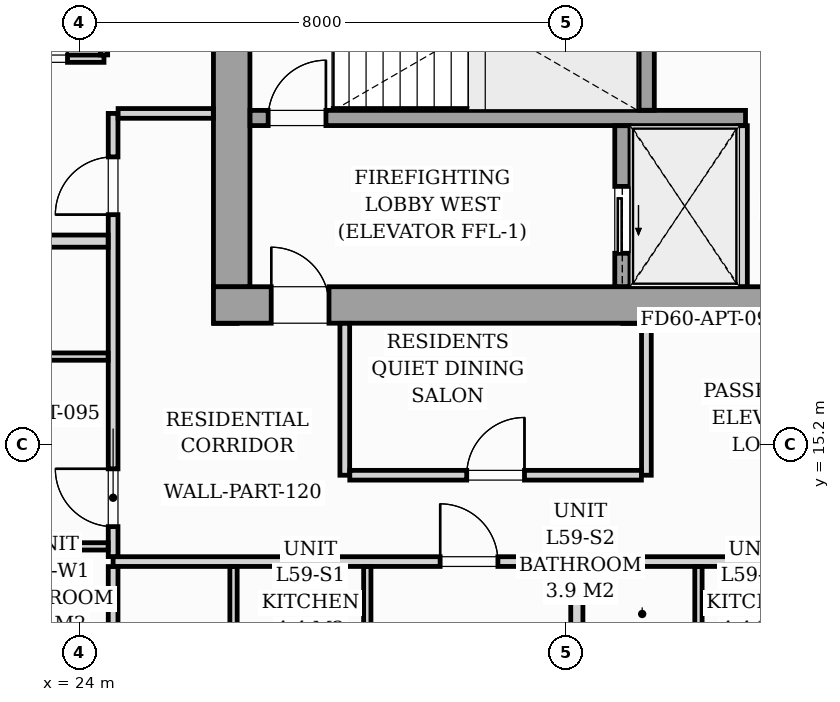
"""IFC4 building model, lengths in metres.
Left out: names, types, materials, properties, quantities, classifications, styles, units other than length and angle.
Written with IfcOpenShell. Run it as: python <this file> out.ifc"""

import sys

from ifc_helpers import new_model, si_unit, direction, frame, frame_2d, origin, origin_2d, place, context, subcontext, project, spatial, rectangle, i_section, extrude, source, transform, mapped, element, fill, save


model = new_model("IFC4")
c1 = context("Model", 3, precision=1e-05, world=origin(), true_north=direction((0.0, 1.0)))
c2 = subcontext(c1, "Body", "Model", "MODEL_VIEW")
j1 = project(units=[si_unit("LENGTHUNIT", "METRE"), si_unit("PLANEANGLEUNIT", "RADIAN")], contexts=[c1])
p1 = place(None, origin())
s1 = spatial("IfcSite", under=j1, at=p1, CompositionType="ELEMENT")
p2 = place(p1, origin())
s2 = spatial("IfcBuilding", under=s1, at=p2, CompositionType="ELEMENT")
p3 = place(p2, frame((0.0, 0.0, 205.0)))
s3 = spatial("IfcBuildingStorey", under=s2, at=p3, CompositionType="ELEMENT", Elevation=205.0)
m1 = source(origin(), c2, "Body", "SweptSolid", [
    extrude(i_section(OverallWidth=0.416, OverallDepth=0.446, WebThickness=0.039, FlangeThickness=0.063, FilletRadius=0.018, at=origin_2d()), origin(), (0.0, 0.0, 1.0), 3.196),
])
for number, where, z_axis, x_axis in (
    (1, (26.4, 17.4, 0.002), (0.0, 0.0, 1.0), (1.0, 0.0, 0.0)),
    (2, (33.12, 17.4, 0.002), (0.0, 0.0, 1.0), (1.0, 0.0, 0.0)),
):
    element("IfcColumn", number, at=place(p3, frame(where, z_axis=z_axis, x_axis=x_axis)), inside=s3, PredefinedType="PILASTER", context=c2, shape_type="MappedRepresentation", body=[
        mapped(m1, transform((0.0, 0.0, 0.0), scale=1.0)),
    ])
p4 = place(p3, frame((26.2, 17.5, 0.0), z_axis=(0.0, 0.0, 1.0), x_axis=(1.0, 0.0, 0.0)))
e3 = element("IfcWall", 3, at=p4, inside=s3, PredefinedType="SHEAR", context=c2, shape_type="SweptSolid", body=[
    extrude(rectangle(XDim=19.6, YDim=0.6, at=frame_2d((9.8, 0.0))), origin(), (0.0, 0.0, 1.0), 3.2),
])
p5 = place(p4, frame((0.95, 0.0, 0.0)))
e4 = element("IfcOpeningElement", 4, at=p5, cuts=e3, PredefinedType="OPENING", context=c2, shape_type="SweptSolid", body=[
    extrude(rectangle(XDim=0.95, YDim=2.06, at=frame_2d((0.475, 1.03))), frame((0.0, 0.31, 0.0), z_axis=(0.0, -1.0, 0.0), x_axis=(1.0, 0.0, 0.0)), (0.0, 0.0, 1.0), 0.62),
])
p6 = place(p4, frame((9.38, 0.0, 0.0)))
e5 = element("IfcOpeningElement", 5, at=p6, cuts=e3, PredefinedType="OPENING", context=c2, shape_type="SweptSolid", body=[
    extrude(rectangle(XDim=0.85, YDim=2.0, at=frame_2d((0.425, 1.0))), frame((0.0, 0.31, 0.0), z_axis=(0.0, -1.0, 0.0), x_axis=(1.0, 0.0, 0.0)), (0.0, 0.0, 1.0), 0.62),
])
p7 = place(p4, frame((17.55, 0.0, 0.0)))
e6 = element("IfcOpeningElement", 6, at=p7, cuts=e3, PredefinedType="OPENING", context=c2, shape_type="SweptSolid", body=[
    extrude(rectangle(XDim=0.95, YDim=2.06, at=frame_2d((0.475, 1.03))), frame((0.0, 0.31, 0.0), z_axis=(0.0, -1.0, 0.0), x_axis=(1.0, 0.0, 0.0)), (0.0, 0.0, 1.0), 0.62),
])
p8 = place(p3, frame((26.5, 17.802, 0.0), z_axis=(0.0, 0.0, 1.0), x_axis=(0.0, 1.0, 0.0)))
e7 = element("IfcWall", 7, at=p8, inside=s3, PredefinedType="SHEAR", context=c2, shape_type="SweptSolid", body=[
    extrude(rectangle(XDim=5.796, YDim=0.6, at=frame_2d((2.898, 0.0))), origin(), (0.0, 0.0, 1.0), 3.2),
])
p9 = place(p3, frame((26.802, 20.575, 0.0), z_axis=(0.0, 0.0, 1.0), x_axis=(1.0, 0.0, 0.0)))
e8 = element("IfcWall", 8, at=p9, inside=s3, PredefinedType="SOLIDWALL", context=c2, shape_type="SweptSolid", body=[
    extrude(rectangle(XDim=8.148, YDim=0.25, at=frame_2d((4.074, 0.0))), origin(), (0.0, 0.0, 1.0), 3.2),
])
p10 = place(p9, frame((0.298, 0.0, 0.0)))
e9 = element("IfcOpeningElement", 9, at=p10, cuts=e8, PredefinedType="OPENING", context=c2, shape_type="SweptSolid", body=[
    extrude(rectangle(XDim=0.95, YDim=2.06, at=frame_2d((0.475, 1.03))), frame((0.0, 0.135, 0.0), z_axis=(0.0, -1.0, 0.0), x_axis=(1.0, 0.0, 0.0)), (0.0, 0.0, 1.0), 0.27),
])
p11 = place(p3, frame((33.325, 20.702, 0.0), z_axis=(0.0, 0.0, 1.0), x_axis=(0.0, 1.0, 0.0)))
e10 = element("IfcWall", 10, at=p11, inside=s3, PredefinedType="SOLIDWALL", context=c2, shape_type="SweptSolid", body=[
    extrude(rectangle(XDim=2.896, YDim=0.25, at=frame_2d((1.448, 0.0))), origin(), (0.0, 0.0, 1.0), 3.2),
])
p12 = place(p3, frame((32.925, 17.802, 0.0), z_axis=(0.0, 0.0, 1.0), x_axis=(0.0, 1.0, 0.0)))
e11 = element("IfcWall", 11, at=p12, inside=s3, PredefinedType="SOLIDWALL", context=c2, shape_type="SweptSolid", body=[
    extrude(rectangle(XDim=2.646, YDim=0.25, at=frame_2d((1.323, 0.0))), origin(), (0.0, 0.0, 1.0), 3.2),
])
p13 = place(p12, frame((0.548, 0.0, 0.0)))
e12 = element("IfcOpeningElement", 12, at=p13, cuts=e11, PredefinedType="OPENING", context=c2, shape_type="SweptSolid", body=[
    extrude(rectangle(XDim=1.1, YDim=2.08, at=frame_2d((0.55, 1.04))), frame((0.0, 0.135, 0.0), z_axis=(0.0, -1.0, 0.0), x_axis=(1.0, 0.0, 0.0)), (0.0, 0.0, 1.0), 0.27),
])
p14 = place(p3, frame((34.9, 17.802, 0.0), z_axis=(0.0, 0.0, 1.0), x_axis=(0.0, 1.0, 0.0)))
e13 = element("IfcWall", 13, at=p14, inside=s3, PredefinedType="PARTITIONING", context=c2, shape_type="SweptSolid", body=[
    extrude(rectangle(XDim=2.646, YDim=0.16, at=frame_2d((1.323, 0.0))), origin(), (0.0, 0.0, 1.0), 2.94),
])
p15 = place(p3, frame((24.55, 13.28, 0.0), z_axis=(0.0, 0.0, 1.0), x_axis=(1.0, 0.0, 0.0)))
e14 = element("IfcWall", 14, at=p15, inside=s3, PredefinedType="PARTITIONING", context=c2, shape_type="SweptSolid", body=[
    extrude(rectangle(XDim=22.9, YDim=0.16, at=frame_2d((11.45, 0.0))), origin(), (0.0, 0.0, 1.0), 2.94),
])
p16 = place(p15, frame((5.378, 0.0, 0.0)))
e15 = element("IfcOpeningElement", 15, at=p16, cuts=e14, PredefinedType="OPENING", context=c2, shape_type="SweptSolid", body=[
    extrude(rectangle(XDim=0.95, YDim=2.06, at=frame_2d((0.475, 1.03))), frame((0.0, 0.09, 0.0), z_axis=(0.0, -1.0, 0.0), x_axis=(1.0, 0.0, 0.0)), (0.0, 0.0, 1.0), 0.18),
])
p17 = place(p15, frame((13.025, 0.0, 0.0)))
e16 = element("IfcOpeningElement", 16, at=p17, cuts=e14, PredefinedType="OPENING", context=c2, shape_type="SweptSolid", body=[
    extrude(rectangle(XDim=0.95, YDim=2.06, at=frame_2d((0.475, 1.03))), frame((0.0, 0.09, 0.0), z_axis=(0.0, -1.0, 0.0), x_axis=(1.0, 0.0, 0.0)), (0.0, 0.0, 1.0), 0.18),
])
p18 = place(p15, frame((16.572, 0.0, 0.0)))
e17 = element("IfcOpeningElement", 17, at=p18, cuts=e14, PredefinedType="OPENING", context=c2, shape_type="SweptSolid", body=[
    extrude(rectangle(XDim=0.95, YDim=2.06, at=frame_2d((0.475, 1.03))), frame((0.0, 0.09, 0.0), z_axis=(0.0, -1.0, 0.0), x_axis=(1.0, 0.0, 0.0)), (0.0, 0.0, 1.0), 0.18),
])
p19 = place(p3, frame((24.55, 7.11, 0.0), z_axis=(0.0, 0.0, 1.0), x_axis=(0.0, 1.0, 0.0)))
e18 = element("IfcWall", 18, at=p19, inside=s3, PredefinedType="PARTITIONING", context=c2, shape_type="SweptSolid", body=[
    extrude(rectangle(XDim=6.088, YDim=0.16, at=frame_2d((3.044, 0.0))), origin(), (0.0, 0.0, 1.0), 2.94),
])
p20 = place(p3, frame((24.55, 13.362, 0.0), z_axis=(0.0, 0.0, 1.0), x_axis=(0.0, 1.0, 0.0)))
e19 = element("IfcWall", 19, at=p20, inside=s3, PredefinedType="PARTITIONING", context=c2, shape_type="SweptSolid", body=[
    extrude(rectangle(XDim=7.288, YDim=0.16, at=frame_2d((3.644, 0.0))), origin(), (0.0, 0.0, 1.0), 2.94),
])
p21 = place(p20, frame((0.493, 0.0, 0.0)))
e20 = element("IfcOpeningElement", 20, at=p21, cuts=e19, PredefinedType="OPENING", context=c2, shape_type="SweptSolid", body=[
    extrude(rectangle(XDim=0.95, YDim=2.06, at=frame_2d((0.475, 1.03))), frame((0.0, 0.09, 0.0), z_axis=(0.0, -1.0, 0.0), x_axis=(1.0, 0.0, 0.0)), (0.0, 0.0, 1.0), 0.18),
])
p22 = place(p20, frame((5.623, 0.0, 0.0)))
e21 = element("IfcOpeningElement", 21, at=p22, cuts=e19, PredefinedType="OPENING", context=c2, shape_type="SweptSolid", body=[
    extrude(rectangle(XDim=0.95, YDim=2.06, at=frame_2d((0.475, 1.03))), frame((0.0, 0.09, 0.0), z_axis=(0.0, -1.0, 0.0), x_axis=(1.0, 0.0, 0.0)), (0.0, 0.0, 1.0), 0.18),
])
p23 = place(p3, frame((24.632, 20.65, 0.0), z_axis=(0.0, 0.0, 1.0), x_axis=(1.0, 0.0, 0.0)))
e22 = element("IfcWall", 22, at=p23, inside=s3, PredefinedType="PARTITIONING", context=c2, shape_type="SweptSolid", body=[
    extrude(rectangle(XDim=1.566, YDim=0.16, at=frame_2d((0.783, 0.0))), origin(), (0.0, 0.0, 1.0), 2.94),
])
for number, where, z_axis, x_axis in (
    (23, (28.73, 11.092, 0.0), (0.0, 0.0, 1.0), (0.0, 1.0, 0.0)),
    (24, (26.53, 11.092, 0.0), (0.0, 0.0, 1.0), (0.0, 1.0, 0.0)),
):
    element("IfcWall", number, at=place(p3, frame(where, z_axis=z_axis, x_axis=x_axis)), inside=s3, PredefinedType="PARTITIONING", context=c2, shape_type="SweptSolid", body=[
        extrude(rectangle(XDim=2.106, YDim=0.12, at=frame_2d((1.053, 0.0))), origin(), (0.0, 0.0, 1.0), 2.94),
    ])
p24 = place(p3, frame((32.176, 7.844, 0.0), z_axis=(0.0, 0.0, 1.0), x_axis=(0.0, 1.0, 0.0)))
e25 = element("IfcWall", 25, at=p24, inside=s3, PredefinedType="PARTITIONING", context=c2, shape_type="SweptSolid", body=[
    extrude(rectangle(XDim=5.354, YDim=0.2, at=frame_2d((2.677, 0.0))), origin(), (0.0, 0.0, 1.0), 2.94),
])
p25 = place(p3, frame((34.176, 11.092, 0.0), z_axis=(0.0, 0.0, 1.0), x_axis=(0.0, 1.0, 0.0)))
e26 = element("IfcWall", 26, at=p25, inside=s3, PredefinedType="PARTITIONING", context=c2, shape_type="SweptSolid", body=[
    extrude(rectangle(XDim=2.106, YDim=0.12, at=frame_2d((1.053, 0.0))), origin(), (0.0, 0.0, 1.0), 2.94),
])
p26 = place(p3, frame((13.561, 18.55, 0.0), z_axis=(0.0, 0.0, 1.0), x_axis=(1.0, 0.0, 0.0)))
e27 = element("IfcWall", 27, at=p26, inside=s3, PredefinedType="PARTITIONING", context=c2, shape_type="SweptSolid", body=[
    extrude(rectangle(XDim=10.907, YDim=0.2, at=frame_2d((5.453, 0.0))), origin(), (0.0, 0.0, 1.0), 2.94),
])
p27 = place(p3, frame((22.212, 13.53, 0.0), z_axis=(0.0, 0.0, 1.0), x_axis=(1.0, 0.0, 0.0)))
e28 = element("IfcWall", 28, at=p27, inside=s3, PredefinedType="PARTITIONING", context=c2, shape_type="SweptSolid", body=[
    extrude(rectangle(XDim=2.256, YDim=0.12, at=frame_2d((1.128, 0.0))), origin(), (0.0, 0.0, 1.0), 2.94),
])
p28 = place(p3, frame((16.813, 16.651, 0.0), z_axis=(0.0, 0.0, 1.0), x_axis=(1.0, 0.0, 0.0)))
e29 = element("IfcWall", 29, at=p28, inside=s3, PredefinedType="PARTITIONING", context=c2, shape_type="SweptSolid", body=[
    extrude(rectangle(XDim=7.655, YDim=0.12, at=frame_2d((3.828, 0.0))), origin(), (0.0, 0.0, 1.0), 2.281),
])
p29 = place(p28, frame((3.403, 0.0, 0.0)))
e30 = element("IfcOpeningElement", 30, at=p29, cuts=e29, PredefinedType="OPENING", context=c2, shape_type="SweptSolid", body=[
    extrude(rectangle(XDim=0.85, YDim=2.05, at=frame_2d((0.425, 1.025))), frame((0.0, 0.07, 0.0), z_axis=(0.0, -1.0, 0.0), x_axis=(1.0, 0.0, 0.0)), (0.0, 0.0, 1.0), 0.14),
])
p30 = place(p3, frame((20.2, 21.55, 0.0), z_axis=(0.0, 0.0, 1.0), x_axis=(1.0, 0.0, 0.0)))
e31 = element("IfcWall", 31, at=p30, inside=s3, PredefinedType="PARTITIONING", context=c2, shape_type="SweptSolid", body=[
    extrude(rectangle(XDim=4.2, YDim=0.12, at=frame_2d((2.1, 0.0))), origin(), (0.0, 0.0, 1.0), 2.94),
])
p31 = place(p30, frame((0.675, 0.0, 0.0)))
e32 = element("IfcOpeningElement", 32, at=p31, cuts=e31, PredefinedType="OPENING", context=c2, shape_type="SweptSolid", body=[
    extrude(rectangle(XDim=0.85, YDim=2.05, at=frame_2d((0.425, 1.025))), frame((0.0, 0.07, 0.0), z_axis=(0.0, -1.0, 0.0), x_axis=(1.0, 0.0, 0.0)), (0.0, 0.0, 1.0), 0.14),
])
p32 = place(p30, frame((2.8, 0.0, 0.0)))
e33 = element("IfcOpeningElement", 33, at=p32, cuts=e31, PredefinedType="OPENING", context=c2, shape_type="SweptSolid", body=[
    extrude(rectangle(XDim=0.8, YDim=2.02, at=frame_2d((0.4, 1.01))), frame((0.0, 0.07, 0.0), z_axis=(0.0, -1.0, 0.0), x_axis=(1.0, 0.0, 0.0)), (0.0, 0.0, 1.0), 0.14),
])
p33 = place(p3, frame((24.4, 21.612, 0.0), z_axis=(0.0, 0.0, 1.0), x_axis=(0.0, 1.0, 0.0)))
e34 = element("IfcWall", 34, at=p33, inside=s3, PredefinedType="PARTITIONING", context=c2, shape_type="SweptSolid", body=[
    extrude(rectangle(XDim=2.126, YDim=0.12, at=frame_2d((1.063, 0.0))), origin(), (0.0, 0.0, 1.0), 2.94),
])
for number, where, z_axis, x_axis in (
    (35, (28.36, 14.7, 0.0), (0.0, 0.0, 1.0), (0.0, 1.0, 0.0)),
    (36, (33.32, 14.7, 0.0), (0.0, 0.0, 1.0), (0.0, 1.0, 0.0)),
):
    element("IfcWall", number, at=place(p3, frame(where, z_axis=z_axis, x_axis=x_axis)), inside=s3, PredefinedType="PARTITIONING", context=c2, shape_type="SweptSolid", body=[
        extrude(rectangle(XDim=2.498, YDim=0.16, at=frame_2d((1.249, 0.0))), origin(), (0.0, 0.0, 1.0), 2.94),
    ])
p34 = place(p3, frame((28.442, 14.7, 0.0), z_axis=(0.0, 0.0, 1.0), x_axis=(1.0, 0.0, 0.0)))
e37 = element("IfcWall", 37, at=p34, inside=s3, PredefinedType="PARTITIONING", context=c2, shape_type="SweptSolid", body=[
    extrude(rectangle(XDim=4.796, YDim=0.16, at=frame_2d((2.398, 0.0))), origin(), (0.0, 0.0, 1.0), 2.94),
])
p35 = place(p34, frame((1.923, 0.0, 0.0)))
e38 = element("IfcOpeningElement", 38, at=p35, cuts=e37, PredefinedType="OPENING", context=c2, shape_type="SweptSolid", body=[
    extrude(rectangle(XDim=0.95, YDim=2.06, at=frame_2d((0.475, 1.03))), frame((0.0, 0.09, 0.0), z_axis=(0.0, -1.0, 0.0), x_axis=(1.0, 0.0, 0.0)), (0.0, 0.0, 1.0), 0.18),
])
m2 = source(origin(), c2, "Body", "SweptSolid", [
    extrude(rectangle(XDim=0.95, YDim=2.06, at=frame_2d((0.475, 1.03))), frame((0.0, 0.025, 0.0), z_axis=(0.0, -1.0, 0.0), x_axis=(1.0, 0.0, 0.0)), (0.0, 0.0, 1.0), 0.05),
])
p36 = place(p5, origin())
e39 = element("IfcDoor", 39, at=p36, inside=s3, OperationType="SINGLE_SWING_LEFT", PredefinedType="DOOR", context=c2, shape_type="MappedRepresentation", body=[
    mapped(m2, transform((0.0, 0.0, 0.0), scale=1.0)),
])
fill(e4, e39)
p37 = place(p10, origin())
e40 = element("IfcDoor", 40, at=p37, inside=s3, OperationType="SINGLE_SWING_RIGHT", PredefinedType="DOOR", context=c2, shape_type="MappedRepresentation", body=[
    mapped(m2, transform((0.0, 0.0, 0.0), scale=1.0)),
])
fill(e9, e40)
m3 = source(origin(), c2, "Body", "SweptSolid", [
    extrude(rectangle(XDim=1.1, YDim=2.08, at=frame_2d((0.55, 1.04))), frame((0.0, 0.025, 0.0), z_axis=(0.0, -1.0, 0.0), x_axis=(1.0, 0.0, 0.0)), (0.0, 0.0, 1.0), 0.05),
])
p38 = place(p13, origin())
e41 = element("IfcDoor", 41, at=p38, inside=s3, OperationType="SLIDING_TO_LEFT", PredefinedType="DOOR", context=c2, shape_type="MappedRepresentation", body=[
    mapped(m3, transform((0.0, 0.0, 0.0), scale=1.0)),
])
fill(e12, e41)
m4 = source(origin(), c2, "Body", "SweptSolid", [
    extrude(rectangle(XDim=0.95, YDim=2.06, at=frame_2d((0.475, 1.03))), frame((0.0, 0.025, 0.0), z_axis=(0.0, -1.0, 0.0), x_axis=(1.0, 0.0, 0.0)), (0.0, 0.0, 1.0), 0.05),
])
p39 = place(p16, origin())
e42 = element("IfcDoor", 42, at=p39, inside=s3, OperationType="SINGLE_SWING_LEFT", PredefinedType="DOOR", context=c2, shape_type="MappedRepresentation", body=[
    mapped(m4, transform((0.0, 0.0, 0.0), scale=1.0)),
])
fill(e15, e42)
p40 = place(p21, origin())
e43 = element("IfcDoor", 43, at=p40, inside=s3, OperationType="SINGLE_SWING_RIGHT", PredefinedType="DOOR", context=c2, shape_type="MappedRepresentation", body=[
    mapped(m4, transform((0.0, 0.0, 0.0), scale=1.0)),
])
fill(e20, e43)
p41 = place(p22, origin())
e44 = element("IfcDoor", 44, at=p41, inside=s3, OperationType="SINGLE_SWING_LEFT", PredefinedType="DOOR", context=c2, shape_type="MappedRepresentation", body=[
    mapped(m4, transform((0.0, 0.0, 0.0), scale=1.0)),
])
fill(e21, e44)
m5 = source(origin(), c2, "Body", "SweptSolid", [
    extrude(rectangle(XDim=0.8, YDim=2.02, at=frame_2d((0.4, 1.01))), frame((0.0, 0.025, 0.0), z_axis=(0.0, -1.0, 0.0), x_axis=(1.0, 0.0, 0.0)), (0.0, 0.0, 1.0), 0.05),
])
p42 = place(p32, origin())
e45 = element("IfcDoor", 45, at=p42, inside=s3, OperationType="SINGLE_SWING_RIGHT", PredefinedType="DOOR", context=c2, shape_type="MappedRepresentation", body=[
    mapped(m5, transform((0.0, 0.0, 0.0), scale=1.0)),
])
fill(e33, e45)
p43 = place(p35, origin())
e46 = element("IfcDoor", 46, at=p43, inside=s3, OperationType="SINGLE_SWING_RIGHT", PredefinedType="DOOR", context=c2, shape_type="MappedRepresentation", body=[
    mapped(m4, transform((0.0, 0.0, 0.0), scale=1.0)),
])
fill(e38, e46)
save(model, sys.argv[1])
